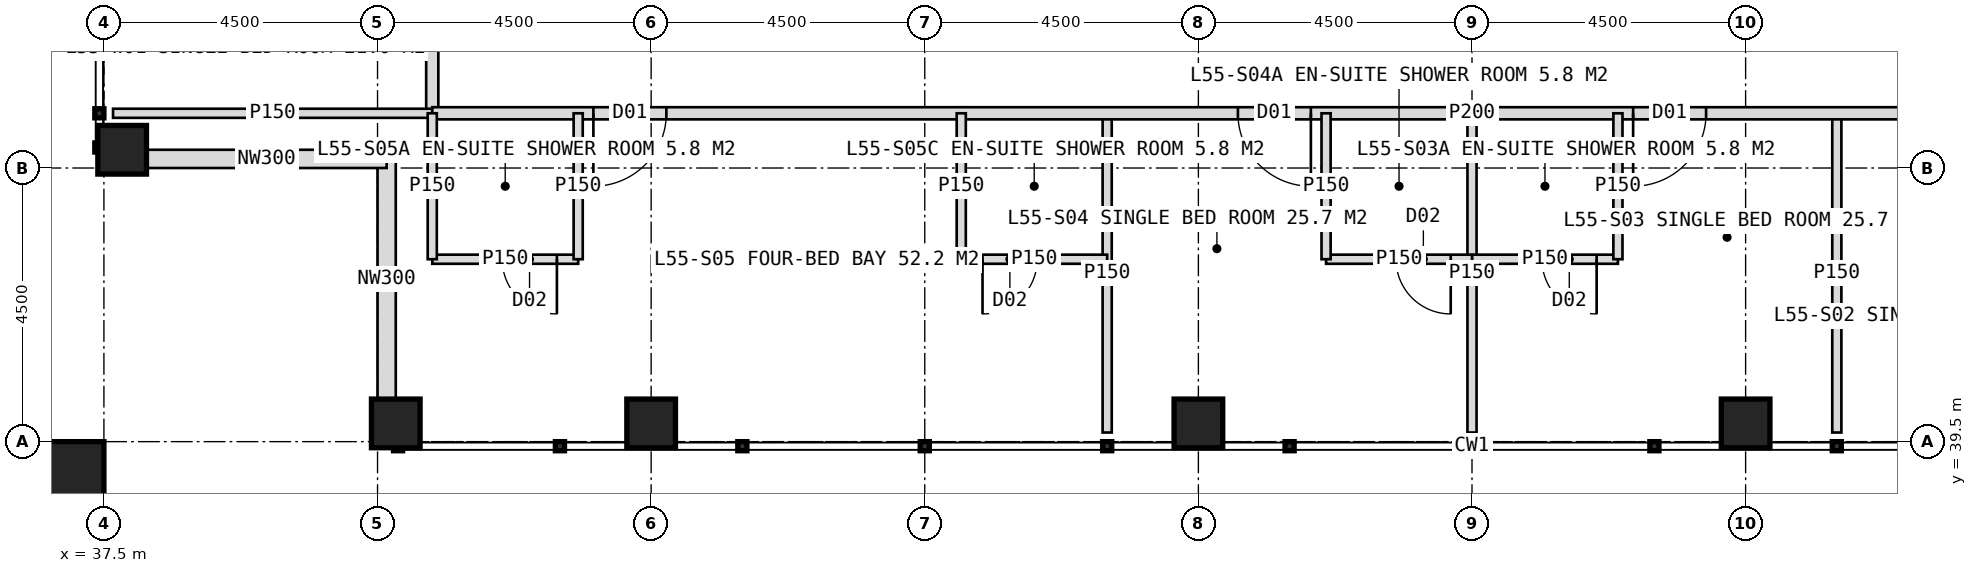
"""IFC4 building model, lengths in metres.
Left out: names, types, materials, properties, quantities, classifications, styles, units other than length and angle.
Written with IfcOpenShell. Run it as: python <this file> out.ifc"""

import sys

from ifc_helpers import new_model, si_unit, direction, frame, frame_2d, origin, origin_2d, place, context, subcontext, project, spatial, rectangle, hollow_rectangle, extrude, element, fill, save


model = new_model("IFC4")
c1 = context("Model", 3, precision=1e-05, world=origin(), true_north=direction((0.0, 1.0)))
c2 = subcontext(c1, "Body", "Model", "MODEL_VIEW")
j1 = project(units=[si_unit("LENGTHUNIT", "METRE"), si_unit("PLANEANGLEUNIT", "RADIAN")], contexts=[c1])
p1 = place(None, origin())
s1 = spatial("IfcSite", under=j1, at=p1, CompositionType="ELEMENT")
p2 = place(p1, origin())
s2 = spatial("IfcBuilding", under=s1, at=p2, CompositionType="ELEMENT")
p3 = place(p2, frame((0.0, 0.0, 229.0)))
s3 = spatial("IfcBuildingStorey", under=s2, at=p3, CompositionType="ELEMENT", Elevation=229.0)
for number, where, z_axis, x_axis in (
    (1, (42.3, 39.8, 0.0), (0.0, 0.0, 1.0), (1.0, 0.0, 0.0)),
    (2, (37.8, 44.3, 0.0), (0.0, 0.0, 1.0), (1.0, 0.0, 0.0)),
    (3, (46.5, 39.8, 0.0), (0.0, 0.0, 1.0), (1.0, 0.0, 0.0)),
    (4, (55.5, 39.8, 0.0), (0.0, 0.0, 1.0), (1.0, 0.0, 0.0)),
    (5, (64.5, 39.8, 0.0), (0.0, 0.0, 1.0), (1.0, 0.0, 0.0)),
):
    element("IfcColumn", number, at=place(p3, frame(where, z_axis=z_axis, x_axis=x_axis)), inside=s3, PredefinedType="COLUMN", context=c2, shape_type="SweptSolid", body=[
        extrude(hollow_rectangle(XDim=0.8, YDim=0.8, WallThickness=0.08, at=origin_2d()), origin(), (0.0, 0.0, 1.0), 4.0),
    ])
p4 = place(p3, frame((36.9, 38.9, 0.0), z_axis=(0.0, 0.0, 1.0), x_axis=(1.0, 0.0, 0.0)))
e6 = element("IfcColumn", 6, at=p4, inside=s3, PredefinedType="COLUMN", context=c2, shape_type="SweptSolid", body=[
    extrude(hollow_rectangle(XDim=1.2, YDim=1.2, WallThickness=0.07, at=origin_2d()), origin(), (0.0, 0.0, 1.0), 4.0),
])
for number, where, z_axis, x_axis in (
    (7, (42.15, 40.2, 0.0), (0.0, 0.0, 1.0), (0.0, 1.0, 0.0)),
    (8, (42.15, 44.15, 0.0), (0.0, 0.0, 1.0), (-1.0, 0.0, 0.0)),
):
    element("IfcWall", number, at=place(p3, frame(where, z_axis=z_axis, x_axis=x_axis)), inside=s3, PredefinedType="ELEMENTEDWALL", context=c2, shape_type="SweptSolid", body=[
        extrude(rectangle(XDim=3.95, YDim=0.3, at=frame_2d((1.975, 0.0))), origin(), (0.0, 0.0, 1.0), 2.85),
    ])
p5 = place(p3, frame((42.9, 44.9, 0.0), z_axis=(0.0, 0.0, 1.0), x_axis=(0.0, 1.0, 0.0)))
e9 = element("IfcWall", 9, at=p5, inside=s3, PredefinedType="PARTITIONING", context=c2, shape_type="SweptSolid", body=[
    extrude(rectangle(XDim=34.2, YDim=0.2, at=frame_2d((17.1, 0.0))), origin(), (0.0, 0.0, 1.0), 3.75),
])
p6 = place(p5, frame((1.25, 0.0, 0.0)))
e10 = element("IfcOpeningElement", 10, at=p6, cuts=e9, PredefinedType="OPENING", context=c2, shape_type="SweptSolid", body=[
    extrude(rectangle(XDim=1.2, YDim=2.2, at=frame_2d((0.6, 1.1))), frame((0.0, 0.11, 0.0), z_axis=(0.0, -1.0, 0.0), x_axis=(1.0, 0.0, 0.0)), (0.0, 0.0, 1.0), 0.22),
])
p7 = place(p5, frame((7.75, 0.0, 0.0)))
e11 = element("IfcOpeningElement", 11, at=p7, cuts=e9, PredefinedType="OPENING", context=c2, shape_type="SweptSolid", body=[
    extrude(rectangle(XDim=1.2, YDim=2.2, at=frame_2d((0.6, 1.1))), frame((0.0, 0.11, 0.0), z_axis=(0.0, -1.0, 0.0), x_axis=(1.0, 0.0, 0.0)), (0.0, 0.0, 1.0), 0.22),
])
p8 = place(p5, frame((13.6, 0.0, 0.0)))
e12 = element("IfcOpeningElement", 12, at=p8, cuts=e9, PredefinedType="OPENING", context=c2, shape_type="SweptSolid", body=[
    extrude(rectangle(XDim=1.0, YDim=2.1, at=frame_2d((0.5, 1.05))), frame((0.0, 0.11, 0.0), z_axis=(0.0, -1.0, 0.0), x_axis=(1.0, 0.0, 0.0)), (0.0, 0.0, 1.0), 0.22),
])
p9 = place(p5, frame((19.75, 0.0, 0.0)))
e13 = element("IfcOpeningElement", 13, at=p9, cuts=e9, PredefinedType="OPENING", context=c2, shape_type="SweptSolid", body=[
    extrude(rectangle(XDim=1.2, YDim=2.2, at=frame_2d((0.6, 1.1))), frame((0.0, 0.11, 0.0), z_axis=(0.0, -1.0, 0.0), x_axis=(1.0, 0.0, 0.0)), (0.0, 0.0, 1.0), 0.22),
])
p10 = place(p5, frame((30.35, 0.0, 0.0)))
e14 = element("IfcOpeningElement", 14, at=p10, cuts=e9, PredefinedType="OPENING", context=c2, shape_type="SweptSolid", body=[
    extrude(rectangle(XDim=1.2, YDim=2.2, at=frame_2d((0.6, 1.1))), frame((0.0, 0.11, 0.0), z_axis=(0.0, -1.0, 0.0), x_axis=(1.0, 0.0, 0.0)), (0.0, 0.0, 1.0), 0.22),
])
for number, where, z_axis, x_axis in (
    (15, (42.9, 44.9, 0.0), (0.0, 0.0, 1.0), (-1.0, 0.0, 0.0)),
    (16, (66.0, 44.9, 0.0), (0.0, 0.0, 1.0), (0.0, -1.0, 0.0)),
):
    element("IfcWall", number, at=place(p3, frame(where, z_axis=z_axis, x_axis=x_axis)), inside=s3, PredefinedType="PARTITIONING", context=c2, shape_type="SweptSolid", body=[
        extrude(rectangle(XDim=5.25, YDim=0.15, at=frame_2d((2.625, 0.0))), origin(), (0.0, 0.0, 1.0), 3.75),
    ])
p11 = place(p3, frame((60.0, 44.9, 0.0), z_axis=(0.0, 0.0, 1.0), x_axis=(0.0, -1.0, 0.0)))
e17 = element("IfcWall", 17, at=p11, inside=s3, PredefinedType="PARTITIONING", context=c2, shape_type="SweptSolid", body=[
    extrude(rectangle(XDim=5.25, YDim=0.15, at=frame_2d((2.625, 0.0))), origin(), (0.0, 0.0, 1.0), 2.95),
])
p12 = place(p3, frame((54.0, 44.9, 0.0), z_axis=(0.0, 0.0, 1.0), x_axis=(0.0, -1.0, 0.0)))
e18 = element("IfcWall", 18, at=p12, inside=s3, PredefinedType="PARTITIONING", context=c2, shape_type="SweptSolid", body=[
    extrude(rectangle(XDim=5.25, YDim=0.15, at=frame_2d((2.625, 0.0))), origin(), (0.0, 0.0, 1.0), 3.75),
])
p13 = place(p3, frame((77.1, 44.9, 0.0), z_axis=(0.0, 0.0, 1.0), x_axis=(-1.0, 0.0, 0.0)))
e19 = element("IfcWall", 19, at=p13, inside=s3, PredefinedType="PARTITIONING", context=c2, shape_type="SweptSolid", body=[
    extrude(rectangle(XDim=34.2, YDim=0.2, at=frame_2d((17.1, 0.0))), origin(), (0.0, 0.0, 1.0), 3.75),
])
p14 = place(p13, frame((1.25, 0.0, 0.0)))
e20 = element("IfcOpeningElement", 20, at=p14, cuts=e19, PredefinedType="OPENING", context=c2, shape_type="SweptSolid", body=[
    extrude(rectangle(XDim=1.2, YDim=2.2, at=frame_2d((0.6, 1.1))), frame((0.0, 0.11, 0.0), z_axis=(0.0, -1.0, 0.0), x_axis=(1.0, 0.0, 0.0)), (0.0, 0.0, 1.0), 0.22),
])
p15 = place(p13, frame((7.75, 0.0, 0.0)))
e21 = element("IfcOpeningElement", 21, at=p15, cuts=e19, PredefinedType="OPENING", context=c2, shape_type="SweptSolid", body=[
    extrude(rectangle(XDim=1.2, YDim=2.2, at=frame_2d((0.6, 1.1))), frame((0.0, 0.11, 0.0), z_axis=(0.0, -1.0, 0.0), x_axis=(1.0, 0.0, 0.0)), (0.0, 0.0, 1.0), 0.22),
])
p16 = place(p13, frame((13.25, 0.0, 0.0)))
e22 = element("IfcOpeningElement", 22, at=p16, cuts=e19, PredefinedType="OPENING", context=c2, shape_type="SweptSolid", body=[
    extrude(rectangle(XDim=1.2, YDim=2.2, at=frame_2d((0.6, 1.1))), frame((0.0, 0.11, 0.0), z_axis=(0.0, -1.0, 0.0), x_axis=(1.0, 0.0, 0.0)), (0.0, 0.0, 1.0), 0.22),
])
p17 = place(p13, frame((19.75, 0.0, 0.0)))
e23 = element("IfcOpeningElement", 23, at=p17, cuts=e19, PredefinedType="OPENING", context=c2, shape_type="SweptSolid", body=[
    extrude(rectangle(XDim=1.2, YDim=2.2, at=frame_2d((0.6, 1.1))), frame((0.0, 0.11, 0.0), z_axis=(0.0, -1.0, 0.0), x_axis=(1.0, 0.0, 0.0)), (0.0, 0.0, 1.0), 0.22),
])
p18 = place(p13, frame((30.35, 0.0, 0.0)))
e24 = element("IfcOpeningElement", 24, at=p18, cuts=e19, PredefinedType="OPENING", context=c2, shape_type="SweptSolid", body=[
    extrude(rectangle(XDim=1.2, YDim=2.2, at=frame_2d((0.6, 1.1))), frame((0.0, 0.11, 0.0), z_axis=(0.0, -1.0, 0.0), x_axis=(1.0, 0.0, 0.0)), (0.0, 0.0, 1.0), 0.22),
])
p19 = place(p3, frame((62.4, 42.5, 0.0), z_axis=(0.0, 0.0, 1.0), x_axis=(-1.0, 0.0, 0.0)))
e25 = element("IfcWall", 25, at=p19, inside=s3, PredefinedType="PARTITIONING", context=c2, shape_type="SweptSolid", body=[
    extrude(rectangle(XDim=2.4, YDim=0.15, at=frame_2d((1.2, 0.0))), origin(), (0.0, 0.0, 1.0), 3.75),
])
p20 = place(p19, frame((0.35, 0.0, 0.0)))
e26 = element("IfcOpeningElement", 26, at=p20, cuts=e25, PredefinedType="OPENING", context=c2, shape_type="SweptSolid", body=[
    extrude(rectangle(XDim=0.9, YDim=2.1, at=frame_2d((0.45, 1.05))), frame((0.0, 0.085, 0.0), z_axis=(0.0, -1.0, 0.0), x_axis=(1.0, 0.0, 0.0)), (0.0, 0.0, 1.0), 0.17),
])
p21 = place(p3, frame((62.4, 44.9, 0.0), z_axis=(0.0, 0.0, 1.0), x_axis=(0.0, -1.0, 0.0)))
e27 = element("IfcWall", 27, at=p21, inside=s3, PredefinedType="PARTITIONING", context=c2, shape_type="SweptSolid", body=[
    extrude(rectangle(XDim=2.4, YDim=0.15, at=frame_2d((1.2, 0.0))), origin(), (0.0, 0.0, 1.0), 3.75),
])
p22 = place(p3, frame((60.0, 42.5, 0.0), z_axis=(0.0, 0.0, 1.0), x_axis=(-1.0, 0.0, 0.0)))
e28 = element("IfcWall", 28, at=p22, inside=s3, PredefinedType="PARTITIONING", context=c2, shape_type="SweptSolid", body=[
    extrude(rectangle(XDim=2.4, YDim=0.15, at=frame_2d((1.2, 0.0))), origin(), (0.0, 0.0, 1.0), 3.75),
])
p23 = place(p22, frame((0.35, 0.0, 0.0)))
e29 = element("IfcOpeningElement", 29, at=p23, cuts=e28, PredefinedType="OPENING", context=c2, shape_type="SweptSolid", body=[
    extrude(rectangle(XDim=0.9, YDim=2.1, at=frame_2d((0.45, 1.05))), frame((0.0, 0.085, 0.0), z_axis=(0.0, -1.0, 0.0), x_axis=(1.0, 0.0, 0.0)), (0.0, 0.0, 1.0), 0.17),
])
p24 = place(p3, frame((57.6, 44.9, 0.0), z_axis=(0.0, 0.0, 1.0), x_axis=(0.0, -1.0, 0.0)))
e30 = element("IfcWall", 30, at=p24, inside=s3, PredefinedType="PARTITIONING", context=c2, shape_type="SweptSolid", body=[
    extrude(rectangle(XDim=2.4, YDim=0.15, at=frame_2d((1.2, 0.0))), origin(), (0.0, 0.0, 1.0), 3.75),
])
p25 = place(p3, frame((45.3, 42.5, 0.0), z_axis=(0.0, 0.0, 1.0), x_axis=(-1.0, 0.0, 0.0)))
e31 = element("IfcWall", 31, at=p25, inside=s3, PredefinedType="PARTITIONING", context=c2, shape_type="SweptSolid", body=[
    extrude(rectangle(XDim=2.4, YDim=0.15, at=frame_2d((1.2, 0.0))), origin(), (0.0, 0.0, 1.0), 3.75),
])
p26 = place(p25, frame((0.35, 0.0, 0.0)))
e32 = element("IfcOpeningElement", 32, at=p26, cuts=e31, PredefinedType="OPENING", context=c2, shape_type="SweptSolid", body=[
    extrude(rectangle(XDim=0.9, YDim=2.1, at=frame_2d((0.45, 1.05))), frame((0.0, 0.085, 0.0), z_axis=(0.0, -1.0, 0.0), x_axis=(1.0, 0.0, 0.0)), (0.0, 0.0, 1.0), 0.17),
])
p27 = place(p3, frame((45.3, 44.9, 0.0), z_axis=(0.0, 0.0, 1.0), x_axis=(0.0, -1.0, 0.0)))
e33 = element("IfcWall", 33, at=p27, inside=s3, PredefinedType="PARTITIONING", context=c2, shape_type="SweptSolid", body=[
    extrude(rectangle(XDim=2.4, YDim=0.15, at=frame_2d((1.2, 0.0))), origin(), (0.0, 0.0, 1.0), 3.75),
])
p28 = place(p3, frame((54.0, 42.5, 0.0), z_axis=(0.0, 0.0, 1.0), x_axis=(-1.0, 0.0, 0.0)))
e34 = element("IfcWall", 34, at=p28, inside=s3, PredefinedType="PARTITIONING", context=c2, shape_type="SweptSolid", body=[
    extrude(rectangle(XDim=2.4, YDim=0.15, at=frame_2d((1.2, 0.0))), origin(), (0.0, 0.0, 1.0), 3.75),
])
p29 = place(p28, frame((1.15, 0.0, 0.0)))
e35 = element("IfcOpeningElement", 35, at=p29, cuts=e34, PredefinedType="OPENING", context=c2, shape_type="SweptSolid", body=[
    extrude(rectangle(XDim=0.9, YDim=2.1, at=frame_2d((0.45, 1.05))), frame((0.0, 0.085, 0.0), z_axis=(0.0, -1.0, 0.0), x_axis=(1.0, 0.0, 0.0)), (0.0, 0.0, 1.0), 0.17),
])
for number, where, z_axis, x_axis in (
    (36, (51.6, 44.9, 0.0), (0.0, 0.0, 1.0), (0.0, -1.0, 0.0)),
    (37, (42.9, 44.9, 0.0), (0.0, 0.0, 1.0), (0.0, -1.0, 0.0)),
):
    element("IfcWall", number, at=place(p3, frame(where, z_axis=z_axis, x_axis=x_axis)), inside=s3, PredefinedType="PARTITIONING", context=c2, shape_type="SweptSolid", body=[
        extrude(rectangle(XDim=2.4, YDim=0.15, at=frame_2d((1.2, 0.0))), origin(), (0.0, 0.0, 1.0), 3.75),
    ])
p30 = place(p16, origin())
e38 = element("IfcDoor", 38, at=p30, inside=s3, OperationType="SINGLE_SWING_RIGHT", PredefinedType="DOOR", context=c2, shape_type="SweptSolid", body=[
    extrude(rectangle(XDim=1.2, YDim=2.2, at=frame_2d((0.6, 1.1))), frame((0.0, 0.025, 0.0), z_axis=(0.0, -1.0, 0.0), x_axis=(1.0, 0.0, 0.0)), (0.0, 0.0, 1.0), 0.05),
])
fill(e22, e38)
p31 = place(p20, origin())
e39 = element("IfcDoor", 39, at=p31, inside=s3, OperationType="SINGLE_SWING_LEFT", PredefinedType="DOOR", context=c2, shape_type="SweptSolid", body=[
    extrude(rectangle(XDim=0.9, YDim=2.1, at=frame_2d((0.45, 1.05))), frame((0.0, 0.025, 0.0), z_axis=(0.0, -1.0, 0.0), x_axis=(1.0, 0.0, 0.0)), (0.0, 0.0, 1.0), 0.05),
])
fill(e26, e39)
p32 = place(p17, origin())
e40 = element("IfcDoor", 40, at=p32, inside=s3, OperationType="SINGLE_SWING_LEFT", PredefinedType="DOOR", context=c2, shape_type="SweptSolid", body=[
    extrude(rectangle(XDim=1.2, YDim=2.2, at=frame_2d((0.6, 1.1))), frame((0.0, 0.025, 0.0), z_axis=(0.0, -1.0, 0.0), x_axis=(1.0, 0.0, 0.0)), (0.0, 0.0, 1.0), 0.05),
])
fill(e23, e40)
p33 = place(p23, origin())
e41 = element("IfcDoor", 41, at=p33, inside=s3, OperationType="SINGLE_SWING_LEFT", PredefinedType="DOOR", context=c2, shape_type="SweptSolid", body=[
    extrude(rectangle(XDim=0.9, YDim=2.1, at=frame_2d((0.45, 1.05))), frame((0.0, 0.025, 0.0), z_axis=(0.0, -1.0, 0.0), x_axis=(1.0, 0.0, 0.0)), (0.0, 0.0, 1.0), 0.05),
])
fill(e29, e41)
p34 = place(p18, origin())
e42 = element("IfcDoor", 42, at=p34, inside=s3, OperationType="SINGLE_SWING_RIGHT", PredefinedType="DOOR", context=c2, shape_type="SweptSolid", body=[
    extrude(rectangle(XDim=1.2, YDim=2.2, at=frame_2d((0.6, 1.1))), frame((0.0, 0.025, 0.0), z_axis=(0.0, -1.0, 0.0), x_axis=(1.0, 0.0, 0.0)), (0.0, 0.0, 1.0), 0.05),
])
fill(e24, e42)
p35 = place(p26, origin())
e43 = element("IfcDoor", 43, at=p35, inside=s3, OperationType="SINGLE_SWING_LEFT", PredefinedType="DOOR", context=c2, shape_type="SweptSolid", body=[
    extrude(rectangle(XDim=0.9, YDim=2.1, at=frame_2d((0.45, 1.05))), frame((0.0, 0.025, 0.0), z_axis=(0.0, -1.0, 0.0), x_axis=(1.0, 0.0, 0.0)), (0.0, 0.0, 1.0), 0.05),
])
fill(e32, e43)
p36 = place(p29, origin())
e44 = element("IfcDoor", 44, at=p36, inside=s3, OperationType="SINGLE_SWING_RIGHT", PredefinedType="DOOR", context=c2, shape_type="SweptSolid", body=[
    extrude(rectangle(XDim=0.9, YDim=2.1, at=frame_2d((0.45, 1.05))), frame((0.0, 0.025, 0.0), z_axis=(0.0, -1.0, 0.0), x_axis=(1.0, 0.0, 0.0)), (0.0, 0.0, 1.0), 0.05),
])
fill(e35, e44)
save(model, sys.argv[1])
